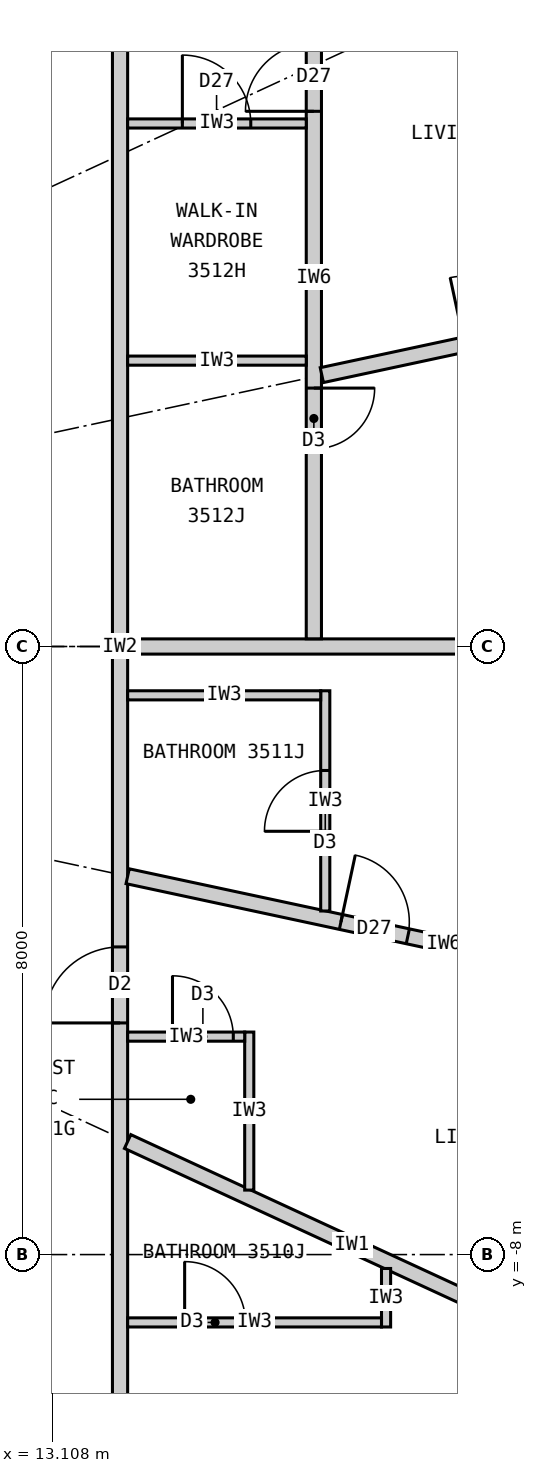
"""IFC4 building model, lengths in metres.
Left out: names, types, materials, properties, quantities, classifications, styles, units other than length and angle.
Written with IfcOpenShell. Run it as: python <this file> out.ifc"""

import sys

from ifc_helpers import new_model, si_unit, direction, frame, frame_2d, origin, place, context, subcontext, project, spatial, rectangle, extrude, element, fill, save


model = new_model("IFC4")
c1 = context("Model", 3, precision=1e-05, world=origin(), true_north=direction((0.0, 1.0)))
c2 = subcontext(c1, "Body", "Model", "MODEL_VIEW")
j1 = project(units=[si_unit("LENGTHUNIT", "METRE"), si_unit("PLANEANGLEUNIT", "RADIAN")], contexts=[c1])
p1 = place(None, origin())
s1 = spatial("IfcSite", under=j1, at=p1, CompositionType="ELEMENT")
p2 = place(p1, origin())
s2 = spatial("IfcBuilding", under=s1, at=p2, CompositionType="ELEMENT")
p3 = place(p2, frame((0.0, 0.0, 135.3)))
s3 = spatial("IfcBuildingStorey", under=s2, at=p3, CompositionType="ELEMENT", Elevation=135.3)
p4 = place(p3, frame((17.332, -13.866, 0.0), z_axis=(0.0, 0.0, 1.0), x_axis=(0.700136650834, 0.714008872605, 0.0)))
e1 = element("IfcWall", 1, at=p4, inside=s3, PredefinedType="ELEMENTEDWALL", context=c2, shape_type="SweptSolid", body=[
    extrude(rectangle(XDim=5.649, YDim=0.15, at=frame_2d((2.825, 0.0))), origin(), (0.0, 0.0, 1.0), 3.05),
])
p5 = place(p4, frame((1.025, 0.0, 0.9)))
e2 = element("IfcOpeningElement", 2, at=p5, cuts=e1, PredefinedType="OPENING", context=c2, shape_type="SweptSolid", body=[
    extrude(rectangle(XDim=1.5, YDim=1.9, at=frame_2d((0.75, 0.95))), frame((0.0, 0.085, 0.0), z_axis=(0.0, -1.0, 0.0), x_axis=(1.0, 0.0, 0.0)), (0.0, 0.0, 1.0), 0.17),
])
p6 = place(p4, frame((3.125, 0.0, 0.9)))
e3 = element("IfcOpeningElement", 3, at=p6, cuts=e1, PredefinedType="OPENING", context=c2, shape_type="SweptSolid", body=[
    extrude(rectangle(XDim=1.5, YDim=1.9, at=frame_2d((0.75, 0.95))), frame((0.0, 0.085, 0.0), z_axis=(0.0, -1.0, 0.0), x_axis=(1.0, 0.0, 0.0)), (0.0, 0.0, 1.0), 0.17),
])
p7 = place(p3, frame((14.0, -9.9, 0.0), z_axis=(0.0, 0.0, 1.0), x_axis=(0.0, 1.0, 0.0)))
e4 = element("IfcWall", 4, at=p7, inside=s3, PredefinedType="PARTITIONING", context=c2, shape_type="SweptSolid", body=[
    extrude(rectangle(XDim=19.8, YDim=0.2, at=frame_2d((9.9, 0.0))), origin(), (0.0, 0.0, 1.0), 3.05),
])
p8 = place(p7, frame((4.948, 0.0, 0.0)))
e5 = element("IfcOpeningElement", 5, at=p8, cuts=e4, PredefinedType="OPENING", context=c2, shape_type="SweptSolid", body=[
    extrude(rectangle(XDim=1.0, YDim=2.2, at=frame_2d((0.5, 1.1))), frame((0.0, 0.11, 0.0), z_axis=(0.0, -1.0, 0.0), x_axis=(1.0, 0.0, 0.0)), (0.0, 0.0, 1.0), 0.22),
])
p9 = place(p7, frame((18.641, 0.0, 0.0)))
e6 = element("IfcOpeningElement", 6, at=p9, cuts=e4, PredefinedType="OPENING", context=c2, shape_type="SweptSolid", body=[
    extrude(rectangle(XDim=1.0, YDim=2.2, at=frame_2d((0.5, 1.1))), frame((0.0, 0.11, 0.0), z_axis=(0.0, -1.0, 0.0), x_axis=(1.0, 0.0, 0.0)), (0.0, 0.0, 1.0), 0.22),
])
p10 = place(p3, frame((14.1, 0.0, 0.0), z_axis=(0.0, 0.0, 1.0), x_axis=(1.0, 0.0, 0.0)))
e7 = element("IfcWall", 7, at=p10, inside=s3, PredefinedType="PARTITIONING", context=c2, shape_type="SweptSolid", body=[
    extrude(rectangle(XDim=9.15, YDim=0.2, at=frame_2d((4.575, 0.0))), origin(), (0.0, 0.0, 1.0), 2.15),
])
p11 = place(p3, frame((14.1, -6.512, 0.0), z_axis=(0.0, 0.0, 1.0), x_axis=(0.907833019998, -0.419331858797, 0.0)))
e8 = element("IfcWall", 8, at=p11, inside=s3, PredefinedType="PARTITIONING", context=c2, shape_type="SweptSolid", body=[
    extrude(rectangle(XDim=6.505, YDim=0.2, at=frame_2d((3.252, 0.0))), origin(), (0.0, 0.0, 1.0), 2.15),
])
p12 = place(p3, frame((14.1, -3.022, 0.0), z_axis=(0.0, 0.0, 1.0), x_axis=(0.977783513367, -0.209617272638, 0.0)))
e9 = element("IfcWall", 9, at=p12, inside=s3, PredefinedType="PARTITIONING", context=c2, shape_type="SweptSolid", body=[
    extrude(rectangle(XDim=8.508, YDim=0.2, at=frame_2d((4.254, 0.0))), origin(), (0.0, 0.0, 1.0), 2.15),
])
p13 = place(p12, frame((2.87, 0.0, 0.0)))
e10 = element("IfcOpeningElement", 10, at=p13, cuts=e9, PredefinedType="OPENING", context=c2, shape_type="SweptSolid", body=[
    extrude(rectangle(XDim=0.9, YDim=2.1, at=frame_2d((0.45, 1.05))), frame((0.0, 0.11, 0.0), z_axis=(0.0, -1.0, 0.0), x_axis=(1.0, 0.0, 0.0)), (0.0, 0.0, 1.0), 0.22),
])
p14 = place(p3, frame((17.5, -8.183, 0.0), z_axis=(0.0, 0.0, 1.0), x_axis=(0.0, -1.0, 0.0)))
e11 = element("IfcWall", 11, at=p14, inside=s3, PredefinedType="PARTITIONING", context=c2, shape_type="SweptSolid", body=[
    extrude(rectangle(XDim=0.77, YDim=0.12, at=frame_2d((0.385, 0.0))), origin(), (0.0, 0.0, 1.0), 3.05),
])
p15 = place(p3, frame((14.1, -8.893, 0.0), z_axis=(0.0, 0.0, 1.0), x_axis=(1.0, 0.0, 0.0)))
e12 = element("IfcWall", 12, at=p15, inside=s3, PredefinedType="PARTITIONING", context=c2, shape_type="SweptSolid", body=[
    extrude(rectangle(XDim=3.34, YDim=0.12, at=frame_2d((1.67, 0.0))), origin(), (0.0, 0.0, 1.0), 3.05),
])
p16 = place(p15, frame((0.75, 0.0, 0.0)))
e13 = element("IfcOpeningElement", 13, at=p16, cuts=e12, PredefinedType="OPENING", context=c2, shape_type="SweptSolid", body=[
    extrude(rectangle(XDim=0.8, YDim=2.1, at=frame_2d((0.4, 1.05))), frame((0.0, 0.07, 0.0), z_axis=(0.0, -1.0, 0.0), x_axis=(1.0, 0.0, 0.0)), (0.0, 0.0, 1.0), 0.14),
])
p17 = place(p3, frame((15.7, -7.152, 0.0), z_axis=(0.0, 0.0, 1.0), x_axis=(0.0, 1.0, 0.0)))
e14 = element("IfcWall", 14, at=p17, inside=s3, PredefinedType="PARTITIONING", context=c2, shape_type="SweptSolid", body=[
    extrude(rectangle(XDim=2.079, YDim=0.12, at=frame_2d((1.04, 0.0))), origin(), (0.0, 0.0, 1.0), 3.05),
])
p18 = place(p3, frame((14.1, -5.133, 0.0), z_axis=(0.0, 0.0, 1.0), x_axis=(1.0, 0.0, 0.0)))
e15 = element("IfcWall", 15, at=p18, inside=s3, PredefinedType="PARTITIONING", context=c2, shape_type="SweptSolid", body=[
    extrude(rectangle(XDim=1.54, YDim=0.12, at=frame_2d((0.77, 0.0))), origin(), (0.0, 0.0, 1.0), 3.05),
])
p19 = place(p18, frame((0.59, 0.0, 0.0)))
e16 = element("IfcOpeningElement", 16, at=p19, cuts=e15, PredefinedType="OPENING", context=c2, shape_type="SweptSolid", body=[
    extrude(rectangle(XDim=0.8, YDim=2.1, at=frame_2d((0.4, 1.05))), frame((0.0, 0.07, 0.0), z_axis=(0.0, -1.0, 0.0), x_axis=(1.0, 0.0, 0.0)), (0.0, 0.0, 1.0), 0.14),
])
p20 = place(p3, frame((16.7, -3.48, 0.0), z_axis=(0.0, 0.0, 1.0), x_axis=(0.0, 1.0, 0.0)))
e17 = element("IfcWall", 17, at=p20, inside=s3, PredefinedType="PARTITIONING", context=c2, shape_type="SweptSolid", body=[
    extrude(rectangle(XDim=2.897, YDim=0.12, at=frame_2d((1.449, 0.0))), origin(), (0.0, 0.0, 1.0), 3.05),
])
p21 = place(p20, frame((1.049, 0.0, 0.0)))
e18 = element("IfcOpeningElement", 18, at=p21, cuts=e17, PredefinedType="OPENING", context=c2, shape_type="SweptSolid", body=[
    extrude(rectangle(XDim=0.8, YDim=2.1, at=frame_2d((0.4, 1.05))), frame((0.0, 0.07, 0.0), z_axis=(0.0, -1.0, 0.0), x_axis=(1.0, 0.0, 0.0)), (0.0, 0.0, 1.0), 0.14),
])
p22 = place(p3, frame((14.1, -0.643, 0.0), z_axis=(0.0, 0.0, 1.0), x_axis=(1.0, 0.0, 0.0)))
e19 = element("IfcWall", 19, at=p22, inside=s3, PredefinedType="PARTITIONING", context=c2, shape_type="SweptSolid", body=[
    extrude(rectangle(XDim=2.54, YDim=0.12, at=frame_2d((1.27, 0.0))), origin(), (0.0, 0.0, 1.0), 3.05),
])
p23 = place(p3, frame((16.55, 0.101, 0.0), z_axis=(0.0, 0.0, 1.0), x_axis=(0.0, 1.0, 0.0)))
e20 = element("IfcWall", 20, at=p23, inside=s3, PredefinedType="PARTITIONING", context=c2, shape_type="SweptSolid", body=[
    extrude(rectangle(XDim=9.508, YDim=0.2, at=frame_2d((4.754, 0.0))), origin(), (0.0, 0.0, 1.0), 3.05),
])
p24 = place(p23, frame((2.499, 0.0, 0.0)))
e21 = element("IfcOpeningElement", 21, at=p24, cuts=e20, PredefinedType="OPENING", context=c2, shape_type="SweptSolid", body=[
    extrude(rectangle(XDim=0.8, YDim=2.1, at=frame_2d((0.4, 1.05))), frame((0.0, 0.11, 0.0), z_axis=(0.0, -1.0, 0.0), x_axis=(1.0, 0.0, 0.0)), (0.0, 0.0, 1.0), 0.22),
])
p25 = place(p23, frame((6.94, 0.0, 0.0)))
e22 = element("IfcOpeningElement", 22, at=p25, cuts=e20, PredefinedType="OPENING", context=c2, shape_type="SweptSolid", body=[
    extrude(rectangle(XDim=0.9, YDim=2.1, at=frame_2d((0.45, 1.05))), frame((0.0, 0.11, 0.0), z_axis=(0.0, -1.0, 0.0), x_axis=(1.0, 0.0, 0.0)), (0.0, 0.0, 1.0), 0.22),
])
p26 = place(p3, frame((16.655, 3.57, 0.0), z_axis=(0.0, 0.0, 1.0), x_axis=(0.977781197989, 0.209628072687, 0.0)))
e23 = element("IfcWall", 23, at=p26, inside=s3, PredefinedType="PARTITIONING", context=c2, shape_type="SweptSolid", body=[
    extrude(rectangle(XDim=5.896, YDim=0.2, at=frame_2d((2.948, 0.0))), origin(), (0.0, 0.0, 1.0), 2.15),
])
p27 = place(p26, frame((1.92, 0.0, 0.0)))
e24 = element("IfcOpeningElement", 24, at=p27, cuts=e23, PredefinedType="OPENING", context=c2, shape_type="SweptSolid", body=[
    extrude(rectangle(XDim=0.9, YDim=2.1, at=frame_2d((0.45, 1.05))), frame((0.0, 0.11, 0.0), z_axis=(0.0, -1.0, 0.0), x_axis=(1.0, 0.0, 0.0)), (0.0, 0.0, 1.0), 0.22),
])
p28 = place(p3, frame((14.1, 3.761, 0.0), z_axis=(0.0, 0.0, 1.0), x_axis=(1.0, 0.0, 0.0)))
e25 = element("IfcWall", 25, at=p28, inside=s3, PredefinedType="PARTITIONING", context=c2, shape_type="SweptSolid", body=[
    extrude(rectangle(XDim=2.35, YDim=0.12, at=frame_2d((1.175, 0.0))), origin(), (0.0, 0.0, 1.0), 2.15),
])
p29 = place(p3, frame((14.1, 6.881, 0.0), z_axis=(0.0, 0.0, 1.0), x_axis=(1.0, 0.0, 0.0)))
e26 = element("IfcWall", 26, at=p29, inside=s3, PredefinedType="PARTITIONING", context=c2, shape_type="SweptSolid", body=[
    extrude(rectangle(XDim=2.35, YDim=0.12, at=frame_2d((1.175, 0.0))), origin(), (0.0, 0.0, 1.0), 3.05),
])
p30 = place(p29, frame((0.72, 0.0, 0.0)))
e27 = element("IfcOpeningElement", 27, at=p30, cuts=e26, PredefinedType="OPENING", context=c2, shape_type="SweptSolid", body=[
    extrude(rectangle(XDim=0.9, YDim=2.1, at=frame_2d((0.45, 1.05))), frame((0.0, 0.07, 0.0), z_axis=(0.0, -1.0, 0.0), x_axis=(1.0, 0.0, 0.0)), (0.0, 0.0, 1.0), 0.14),
])
p31 = place(p16, origin())
e28 = element("IfcDoor", 28, at=p31, inside=s3, OperationType="SINGLE_SWING_LEFT", PredefinedType="DOOR", context=c2, shape_type="SweptSolid", body=[
    extrude(rectangle(XDim=0.8, YDim=2.1, at=frame_2d((0.4, 1.05))), frame((0.0, 0.025, 0.0), z_axis=(0.0, -1.0, 0.0), x_axis=(1.0, 0.0, 0.0)), (0.0, 0.0, 1.0), 0.05),
])
fill(e13, e28)
p32 = place(p19, origin())
e29 = element("IfcDoor", 29, at=p32, inside=s3, OperationType="SINGLE_SWING_LEFT", PredefinedType="DOOR", context=c2, shape_type="SweptSolid", body=[
    extrude(rectangle(XDim=0.8, YDim=2.1, at=frame_2d((0.4, 1.05))), frame((0.0, 0.025, 0.0), z_axis=(0.0, -1.0, 0.0), x_axis=(1.0, 0.0, 0.0)), (0.0, 0.0, 1.0), 0.05),
])
fill(e16, e29)
p33 = place(p8, origin())
e30 = element("IfcDoor", 30, at=p33, inside=s3, OperationType="SINGLE_SWING_LEFT", PredefinedType="DOOR", context=c2, shape_type="SweptSolid", body=[
    extrude(rectangle(XDim=1.0, YDim=2.2, at=frame_2d((0.5, 1.1))), frame((0.0, 0.025, 0.0), z_axis=(0.0, -1.0, 0.0), x_axis=(1.0, 0.0, 0.0)), (0.0, 0.0, 1.0), 0.05),
])
fill(e5, e30)
p34 = place(p21, origin())
e31 = element("IfcDoor", 31, at=p34, inside=s3, OperationType="SINGLE_SWING_LEFT", PredefinedType="DOOR", context=c2, shape_type="SweptSolid", body=[
    extrude(rectangle(XDim=0.8, YDim=2.1, at=frame_2d((0.4, 1.05))), frame((0.0, 0.025, 0.0), z_axis=(0.0, -1.0, 0.0), x_axis=(1.0, 0.0, 0.0)), (0.0, 0.0, 1.0), 0.05),
])
fill(e18, e31)
p35 = place(p13, origin())
e32 = element("IfcDoor", 32, at=p35, inside=s3, OperationType="SINGLE_SWING_LEFT", PredefinedType="DOOR", context=c2, shape_type="SweptSolid", body=[
    extrude(rectangle(XDim=0.9, YDim=2.1, at=frame_2d((0.45, 1.05))), frame((0.0, 0.025, 0.0), z_axis=(0.0, -1.0, 0.0), x_axis=(1.0, 0.0, 0.0)), (0.0, 0.0, 1.0), 0.05),
])
fill(e10, e32)
p36 = place(p24, origin())
e33 = element("IfcDoor", 33, at=p36, inside=s3, OperationType="SINGLE_SWING_RIGHT", PredefinedType="DOOR", context=c2, shape_type="SweptSolid", body=[
    extrude(rectangle(XDim=0.8, YDim=2.1, at=frame_2d((0.4, 1.05))), frame((0.0, 0.025, 0.0), z_axis=(0.0, -1.0, 0.0), x_axis=(1.0, 0.0, 0.0)), (0.0, 0.0, 1.0), 0.05),
])
fill(e21, e33)
p37 = place(p30, origin())
e34 = element("IfcDoor", 34, at=p37, inside=s3, OperationType="SINGLE_SWING_LEFT", PredefinedType="DOOR", context=c2, shape_type="SweptSolid", body=[
    extrude(rectangle(XDim=0.9, YDim=2.1, at=frame_2d((0.45, 1.05))), frame((0.0, 0.025, 0.0), z_axis=(0.0, -1.0, 0.0), x_axis=(1.0, 0.0, 0.0)), (0.0, 0.0, 1.0), 0.05),
])
fill(e27, e34)
p38 = place(p25, origin())
e35 = element("IfcDoor", 35, at=p38, inside=s3, OperationType="SINGLE_SWING_LEFT", PredefinedType="DOOR", context=c2, shape_type="SweptSolid", body=[
    extrude(rectangle(XDim=0.9, YDim=2.1, at=frame_2d((0.45, 1.05))), frame((0.0, 0.025, 0.0), z_axis=(0.0, -1.0, 0.0), x_axis=(1.0, 0.0, 0.0)), (0.0, 0.0, 1.0), 0.05),
])
fill(e22, e35)
save(model, sys.argv[1])
